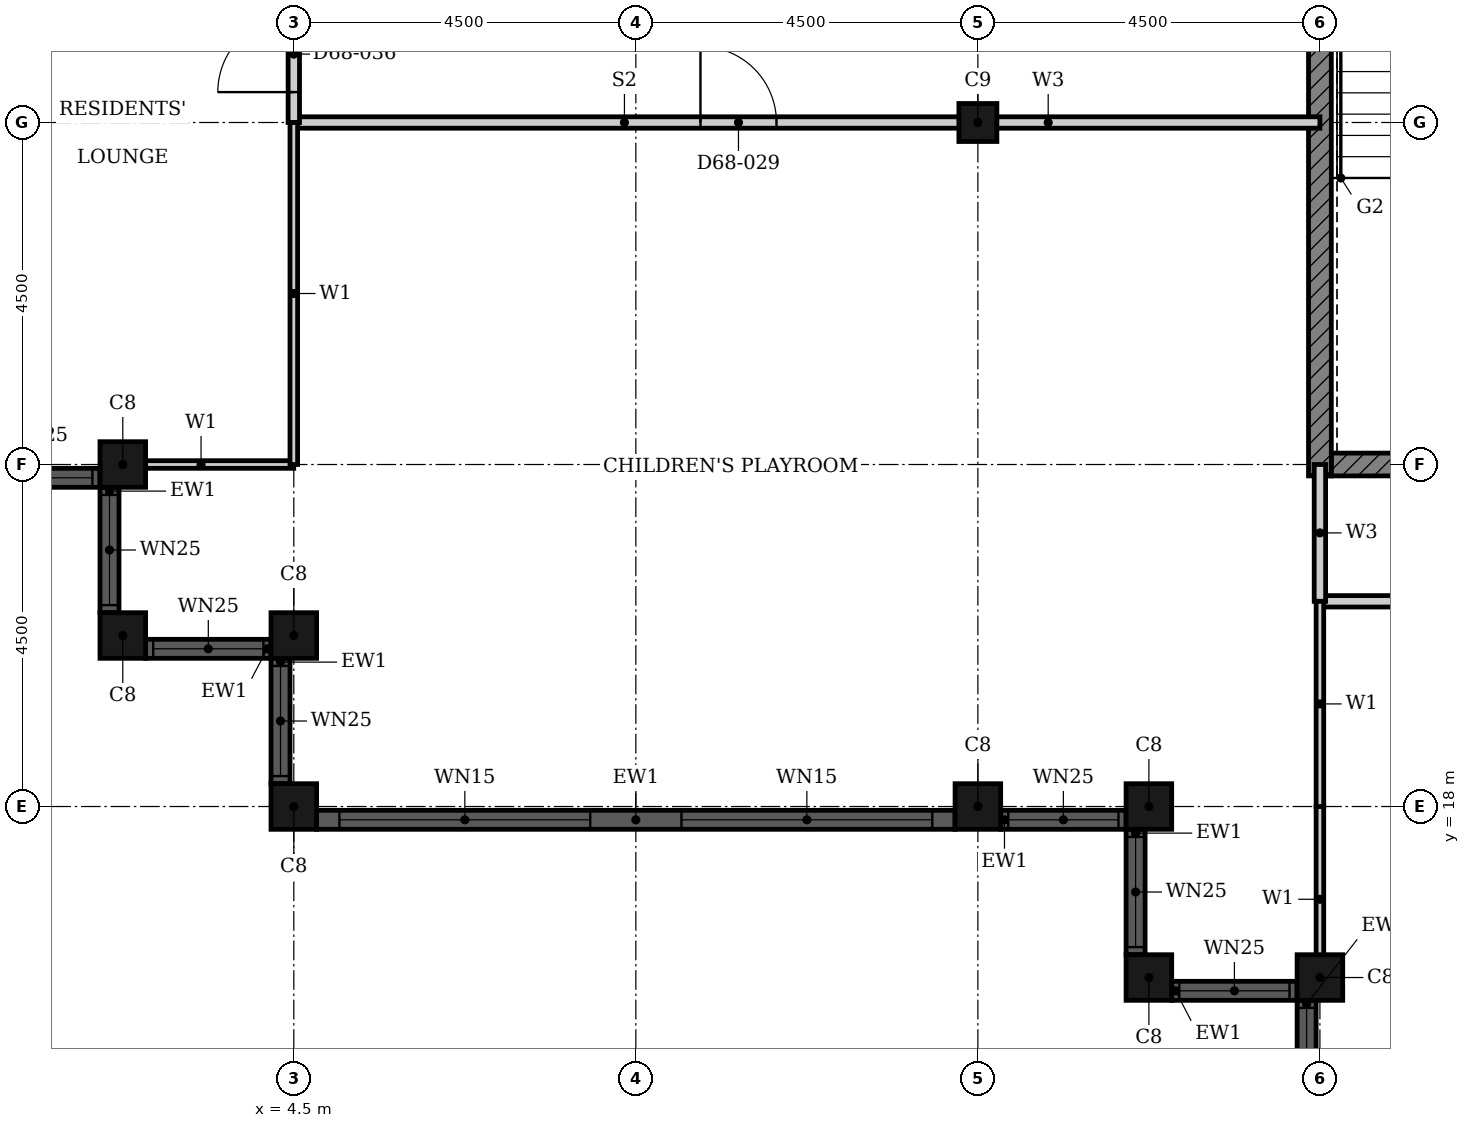
"""IFC4 building model, lengths in metres.
Left out: names, types, materials, properties, quantities, classifications, styles, units other than length and angle.
Written with IfcOpenShell. Run it as: python <this file> out.ifc"""

import sys

from ifc_helpers import new_model, si_unit, direction, frame, frame_2d, origin, origin_2d, place, context, subcontext, project, spatial, rectangle, hollow_rectangle, extrude, element, fill, save


model = new_model("IFC4")
c1 = context("Model", 3, precision=1e-05, world=origin(), true_north=direction((0.0, 1.0)))
c2 = subcontext(c1, "Body", "Model", "MODEL_VIEW")
j1 = project(units=[si_unit("LENGTHUNIT", "METRE"), si_unit("PLANEANGLEUNIT", "RADIAN")], contexts=[c1])
p1 = place(None, origin())
s1 = spatial("IfcSite", under=j1, at=p1, CompositionType="ELEMENT")
p2 = place(p1, origin())
s2 = spatial("IfcBuilding", under=s1, at=p2, CompositionType="ELEMENT")
p3 = place(p2, frame((0.0, 0.0, 267.5)))
s3 = spatial("IfcBuildingStorey", under=s2, at=p3, CompositionType="ELEMENT", Elevation=267.5)
for number, where, z_axis, x_axis in (
    (1, (15.75, 18.0, 0.0), (0.0, 0.0, 1.0), (1.0, 0.0, 0.0)),
    (2, (15.75, 15.75, 0.0), (0.0, 0.0, 1.0), (1.0, 0.0, 0.0)),
    (3, (18.0, 15.75, 0.0), (0.0, 0.0, 1.0), (1.0, 0.0, 0.0)),
    (4, (2.25, 22.5, 0.0), (0.0, 0.0, 1.0), (1.0, 0.0, 0.0)),
    (5, (2.25, 20.25, 0.0), (0.0, 0.0, 1.0), (1.0, 0.0, 0.0)),
    (6, (4.5, 20.25, 0.0), (0.0, 0.0, 1.0), (1.0, 0.0, 0.0)),
    (7, (4.5, 18.0, 0.0), (0.0, 0.0, 1.0), (1.0, 0.0, 0.0)),
    (8, (13.5, 18.0, 0.0), (0.0, 0.0, 1.0), (1.0, 0.0, 0.0)),
):
    element("IfcColumn", number, at=place(p3, frame(where, z_axis=z_axis, x_axis=x_axis)), inside=s3, PredefinedType="COLUMN", context=c2, shape_type="SweptSolid", body=[
        extrude(hollow_rectangle(XDim=0.6, YDim=0.6, WallThickness=0.02, at=origin_2d()), origin(), (0.0, 0.0, 1.0), 3.7),
    ])
p4 = place(p3, frame((13.5, 27.0, 0.0), z_axis=(0.0, 0.0, 1.0), x_axis=(1.0, 0.0, 0.0)))
e9 = element("IfcColumn", 9, at=p4, inside=s3, PredefinedType="COLUMN", context=c2, shape_type="SweptSolid", body=[
    extrude(hollow_rectangle(XDim=0.5, YDim=0.5, WallThickness=0.016, InnerFilletRadius=0.032, OuterFilletRadius=0.048, at=origin_2d()), origin(), (0.0, 0.0, 1.0), 3.7),
])
p5 = place(p3, frame((15.575, 17.7, 0.0), z_axis=(0.0, 0.0, 1.0), x_axis=(0.0, -1.0, 0.0)))
e10 = element("IfcWall", 10, at=p5, inside=s3, PredefinedType="SOLIDWALL", context=c2, shape_type="SweptSolid", body=[
    extrude(rectangle(XDim=1.65, YDim=0.25, at=frame_2d((0.825, 0.0))), origin(), (0.0, 0.0, 1.0), 3.7),
])
p6 = place(p5, frame((0.1, 0.0, 0.9)))
e11 = element("IfcOpeningElement", 11, at=p6, cuts=e10, PredefinedType="OPENING", context=c2, shape_type="SweptSolid", body=[
    extrude(rectangle(XDim=1.45, YDim=1.85, at=frame_2d((0.725, 0.925))), frame((0.0, 0.135, 0.0), z_axis=(0.0, -1.0, 0.0), x_axis=(1.0, 0.0, 0.0)), (0.0, 0.0, 1.0), 0.27),
])
p7 = place(p3, frame((16.05, 15.575, 0.0), z_axis=(0.0, 0.0, 1.0), x_axis=(1.0, 0.0, 0.0)))
e12 = element("IfcWall", 12, at=p7, inside=s3, PredefinedType="SOLIDWALL", context=c2, shape_type="SweptSolid", body=[
    extrude(rectangle(XDim=1.65, YDim=0.25, at=frame_2d((0.825, 0.0))), origin(), (0.0, 0.0, 1.0), 3.7),
])
p8 = place(p7, frame((0.1, 0.0, 0.9)))
e13 = element("IfcOpeningElement", 13, at=p8, cuts=e12, PredefinedType="OPENING", context=c2, shape_type="SweptSolid", body=[
    extrude(rectangle(XDim=1.45, YDim=1.85, at=frame_2d((0.725, 0.925))), frame((0.0, 0.135, 0.0), z_axis=(0.0, -1.0, 0.0), x_axis=(1.0, 0.0, 0.0)), (0.0, 0.0, 1.0), 0.27),
])
p9 = place(p3, frame((17.825, 15.45, 0.0), z_axis=(0.0, 0.0, 1.0), x_axis=(0.0, -1.0, 0.0)))
e14 = element("IfcWall", 14, at=p9, inside=s3, PredefinedType="SOLIDWALL", context=c2, shape_type="SweptSolid", body=[
    extrude(rectangle(XDim=1.65, YDim=0.25, at=frame_2d((0.825, 0.0))), origin(), (0.0, 0.0, 1.0), 3.7),
])
p10 = place(p9, frame((0.1, 0.0, 0.9)))
e15 = element("IfcOpeningElement", 15, at=p10, cuts=e14, PredefinedType="OPENING", context=c2, shape_type="SweptSolid", body=[
    extrude(rectangle(XDim=1.45, YDim=1.85, at=frame_2d((0.725, 0.925))), frame((0.0, 0.135, 0.0), z_axis=(0.0, -1.0, 0.0), x_axis=(1.0, 0.0, 0.0)), (0.0, 0.0, 1.0), 0.27),
])
p11 = place(p3, frame((0.3, 22.325, 0.0), z_axis=(0.0, 0.0, 1.0), x_axis=(1.0, 0.0, 0.0)))
e16 = element("IfcWall", 16, at=p11, inside=s3, PredefinedType="SOLIDWALL", context=c2, shape_type="SweptSolid", body=[
    extrude(rectangle(XDim=1.65, YDim=0.25, at=frame_2d((0.825, 0.0))), origin(), (0.0, 0.0, 1.0), 3.7),
])
p12 = place(p11, frame((0.1, 0.0, 0.9)))
e17 = element("IfcOpeningElement", 17, at=p12, cuts=e16, PredefinedType="OPENING", context=c2, shape_type="SweptSolid", body=[
    extrude(rectangle(XDim=1.45, YDim=1.85, at=frame_2d((0.725, 0.925))), frame((0.0, 0.135, 0.0), z_axis=(0.0, -1.0, 0.0), x_axis=(1.0, 0.0, 0.0)), (0.0, 0.0, 1.0), 0.27),
])
p13 = place(p3, frame((2.075, 22.2, 0.0), z_axis=(0.0, 0.0, 1.0), x_axis=(0.0, -1.0, 0.0)))
e18 = element("IfcWall", 18, at=p13, inside=s3, PredefinedType="SOLIDWALL", context=c2, shape_type="SweptSolid", body=[
    extrude(rectangle(XDim=1.65, YDim=0.25, at=frame_2d((0.825, 0.0))), origin(), (0.0, 0.0, 1.0), 3.7),
])
p14 = place(p13, frame((0.1, 0.0, 0.9)))
e19 = element("IfcOpeningElement", 19, at=p14, cuts=e18, PredefinedType="OPENING", context=c2, shape_type="SweptSolid", body=[
    extrude(rectangle(XDim=1.45, YDim=1.85, at=frame_2d((0.725, 0.925))), frame((0.0, 0.135, 0.0), z_axis=(0.0, -1.0, 0.0), x_axis=(1.0, 0.0, 0.0)), (0.0, 0.0, 1.0), 0.27),
])
p15 = place(p3, frame((2.55, 20.075, 0.0), z_axis=(0.0, 0.0, 1.0), x_axis=(1.0, 0.0, 0.0)))
e20 = element("IfcWall", 20, at=p15, inside=s3, PredefinedType="SOLIDWALL", context=c2, shape_type="SweptSolid", body=[
    extrude(rectangle(XDim=1.65, YDim=0.25, at=frame_2d((0.825, 0.0))), origin(), (0.0, 0.0, 1.0), 3.7),
])
p16 = place(p15, frame((0.1, 0.0, 0.9)))
e21 = element("IfcOpeningElement", 21, at=p16, cuts=e20, PredefinedType="OPENING", context=c2, shape_type="SweptSolid", body=[
    extrude(rectangle(XDim=1.45, YDim=1.85, at=frame_2d((0.725, 0.925))), frame((0.0, 0.135, 0.0), z_axis=(0.0, -1.0, 0.0), x_axis=(1.0, 0.0, 0.0)), (0.0, 0.0, 1.0), 0.27),
])
p17 = place(p3, frame((4.325, 19.95, 0.0), z_axis=(0.0, 0.0, 1.0), x_axis=(0.0, -1.0, 0.0)))
e22 = element("IfcWall", 22, at=p17, inside=s3, PredefinedType="SOLIDWALL", context=c2, shape_type="SweptSolid", body=[
    extrude(rectangle(XDim=1.65, YDim=0.25, at=frame_2d((0.825, 0.0))), origin(), (0.0, 0.0, 1.0), 3.7),
])
p18 = place(p17, frame((0.1, 0.0, 0.9)))
e23 = element("IfcOpeningElement", 23, at=p18, cuts=e22, PredefinedType="OPENING", context=c2, shape_type="SweptSolid", body=[
    extrude(rectangle(XDim=1.45, YDim=1.85, at=frame_2d((0.725, 0.925))), frame((0.0, 0.135, 0.0), z_axis=(0.0, -1.0, 0.0), x_axis=(1.0, 0.0, 0.0)), (0.0, 0.0, 1.0), 0.27),
])
p19 = place(p3, frame((4.8, 17.825, 0.0), z_axis=(0.0, 0.0, 1.0), x_axis=(1.0, 0.0, 0.0)))
e24 = element("IfcWall", 24, at=p19, inside=s3, PredefinedType="SOLIDWALL", context=c2, shape_type="SweptSolid", body=[
    extrude(rectangle(XDim=8.4, YDim=0.25, at=frame_2d((4.2, 0.0))), origin(), (0.0, 0.0, 1.0), 3.7),
])
p20 = place(p19, frame((0.3, 0.0, 0.45)))
e25 = element("IfcOpeningElement", 25, at=p20, cuts=e24, PredefinedType="OPENING", context=c2, shape_type="SweptSolid", body=[
    extrude(rectangle(XDim=3.3, YDim=2.3, at=frame_2d((1.65, 1.15))), frame((0.0, 0.135, 0.0), z_axis=(0.0, -1.0, 0.0), x_axis=(1.0, 0.0, 0.0)), (0.0, 0.0, 1.0), 0.27),
])
p21 = place(p19, frame((4.8, 0.0, 0.45)))
e26 = element("IfcOpeningElement", 26, at=p21, cuts=e24, PredefinedType="OPENING", context=c2, shape_type="SweptSolid", body=[
    extrude(rectangle(XDim=3.3, YDim=2.3, at=frame_2d((1.65, 1.15))), frame((0.0, 0.135, 0.0), z_axis=(0.0, -1.0, 0.0), x_axis=(1.0, 0.0, 0.0)), (0.0, 0.0, 1.0), 0.27),
])
p22 = place(p3, frame((13.8, 17.825, 0.0), z_axis=(0.0, 0.0, 1.0), x_axis=(1.0, 0.0, 0.0)))
e27 = element("IfcWall", 27, at=p22, inside=s3, PredefinedType="SOLIDWALL", context=c2, shape_type="SweptSolid", body=[
    extrude(rectangle(XDim=1.65, YDim=0.25, at=frame_2d((0.825, 0.0))), origin(), (0.0, 0.0, 1.0), 3.7),
])
p23 = place(p22, frame((0.1, 0.0, 0.9)))
e28 = element("IfcOpeningElement", 28, at=p23, cuts=e27, PredefinedType="OPENING", context=c2, shape_type="SweptSolid", body=[
    extrude(rectangle(XDim=1.45, YDim=1.85, at=frame_2d((0.725, 0.925))), frame((0.0, 0.135, 0.0), z_axis=(0.0, -1.0, 0.0), x_axis=(1.0, 0.0, 0.0)), (0.0, 0.0, 1.0), 0.27),
])
p24 = place(p3, frame((18.15, 22.5, 0.0), z_axis=(0.0, 0.0, 1.0), x_axis=(1.0, 0.0, 0.0)))
e29 = element("IfcWall", 29, at=p24, inside=s3, PredefinedType="SHEAR", context=c2, shape_type="SweptSolid", body=[
    extrude(rectangle(XDim=4.225, YDim=0.3, at=frame_2d((2.113, 0.0))), origin(), (0.0, 0.0, 1.0), 3.4),
])
p25 = place(p3, frame((18.0, 22.35, 0.0), z_axis=(0.0, 0.0, 1.0), x_axis=(0.0, 1.0, 0.0)))
e30 = element("IfcWall", 30, at=p25, inside=s3, PredefinedType="SHEAR", context=c2, shape_type="SweptSolid", body=[
    extrude(rectangle(XDim=9.3, YDim=0.3, at=frame_2d((4.65, 0.0))), origin(), (0.0, 0.0, 1.0), 3.4),
])
p26 = place(p3, frame((18.0, 20.7, 0.0), z_axis=(0.0, 0.0, 1.0), x_axis=(1.0, 0.0, 0.0)))
e31 = element("IfcWall", 31, at=p26, inside=s3, PredefinedType="PARTITIONING", context=c2, shape_type="SweptSolid", body=[
    extrude(rectangle(XDim=24.6, YDim=0.15, at=frame_2d((12.3, 0.0))), origin(), (0.0, 0.0, 1.0), 3.4),
])
p27 = place(p26, frame((4.0, 0.0, 0.0)))
e32 = element("IfcOpeningElement", 32, at=p27, cuts=e31, PredefinedType="OPENING", context=c2, shape_type="SweptSolid", body=[
    extrude(rectangle(XDim=1.0, YDim=2.1, at=frame_2d((0.5, 1.05))), frame((0.0, 0.085, 0.0), z_axis=(0.0, -1.0, 0.0), x_axis=(1.0, 0.0, 0.0)), (0.0, 0.0, 1.0), 0.17),
])
p28 = place(p26, frame((13.0, 0.0, 0.0)))
e33 = element("IfcOpeningElement", 33, at=p28, cuts=e31, PredefinedType="OPENING", context=c2, shape_type="SweptSolid", body=[
    extrude(rectangle(XDim=1.0, YDim=2.1, at=frame_2d((0.5, 1.05))), frame((0.0, 0.085, 0.0), z_axis=(0.0, -1.0, 0.0), x_axis=(1.0, 0.0, 0.0)), (0.0, 0.0, 1.0), 0.17),
])
p29 = place(p26, frame((22.3, 0.0, 0.0)))
e34 = element("IfcOpeningElement", 34, at=p29, cuts=e31, PredefinedType="OPENING", context=c2, shape_type="SweptSolid", body=[
    extrude(rectangle(XDim=1.0, YDim=2.2, at=frame_2d((0.5, 1.1))), frame((0.0, 0.085, 0.0), z_axis=(0.0, -1.0, 0.0), x_axis=(1.0, 0.0, 0.0)), (0.0, 0.0, 1.0), 0.17),
])
p30 = place(p3, frame((4.5, 27.0, 0.0), z_axis=(0.0, 0.0, 1.0), x_axis=(1.0, 0.0, 0.0)))
e35 = element("IfcWall", 35, at=p30, inside=s3, PredefinedType="PARTITIONING", context=c2, shape_type="SweptSolid", body=[
    extrude(rectangle(XDim=13.5, YDim=0.15, at=frame_2d((6.75, 0.0))), origin(), (0.0, 0.0, 1.0), 2.68),
])
p31 = place(p30, frame((5.35, 0.0, 0.0)))
e36 = element("IfcOpeningElement", 36, at=p31, cuts=e35, PredefinedType="OPENING", context=c2, shape_type="SweptSolid", body=[
    extrude(rectangle(XDim=1.0, YDim=2.1, at=frame_2d((0.5, 1.05))), frame((0.0, 0.085, 0.0), z_axis=(0.0, -1.0, 0.0), x_axis=(1.0, 0.0, 0.0)), (0.0, 0.0, 1.0), 0.17),
])
p32 = place(p3, frame((18.0, 20.7, 0.0), z_axis=(0.0, 0.0, 1.0), x_axis=(0.0, 1.0, 0.0)))
e37 = element("IfcWall", 37, at=p32, inside=s3, PredefinedType="PARTITIONING", context=c2, shape_type="SweptSolid", body=[
    extrude(rectangle(XDim=1.8, YDim=0.15, at=frame_2d((0.9, 0.0))), origin(), (0.0, 0.0, 1.0), 3.4),
])
p33 = place(p3, frame((4.5, 27.0, 0.0), z_axis=(0.0, 0.0, 1.0), x_axis=(0.0, 1.0, 0.0)))
e38 = element("IfcWall", 38, at=p33, inside=s3, PredefinedType="PARTITIONING", context=c2, shape_type="SweptSolid", body=[
    extrude(rectangle(XDim=1.8, YDim=0.15, at=frame_2d((0.9, 0.0))), origin(), (0.0, 0.0, 1.0), 3.4),
])
p34 = place(p33, frame((0.4, 0.0, 0.0)))
e39 = element("IfcOpeningElement", 39, at=p34, cuts=e38, PredefinedType="OPENING", context=c2, shape_type="SweptSolid", body=[
    extrude(rectangle(XDim=1.0, YDim=2.1, at=frame_2d((0.5, 1.05))), frame((0.0, 0.085, 0.0), z_axis=(0.0, -1.0, 0.0), x_axis=(1.0, 0.0, 0.0)), (0.0, 0.0, 1.0), 0.17),
])
p35 = place(p3, frame((2.06, 22.5, 0.0), z_axis=(0.0, 0.0, 1.0), x_axis=(1.0, 0.0, 0.0)))
e40 = element("IfcWall", 40, at=p35, inside=s3, PredefinedType="PARTITIONING", context=c2, shape_type="SweptSolid", body=[
    extrude(rectangle(XDim=2.439, YDim=0.1, at=frame_2d((1.219, 0.0))), origin(), (0.0, 0.0, 1.0), 2.68),
])
p36 = place(p3, frame((18.0, 15.56, 0.0), z_axis=(0.0, 0.0, 1.0), x_axis=(0.0, 1.0, 0.0)))
e41 = element("IfcWall", 41, at=p36, inside=s3, PredefinedType="PARTITIONING", context=c2, shape_type="SweptSolid", body=[
    extrude(rectangle(XDim=2.439, YDim=0.1, at=frame_2d((1.219, 0.0))), origin(), (0.0, 0.0, 1.0), 3.4),
])
p37 = place(p3, frame((18.0, 18.0, 0.0), z_axis=(0.0, 0.0, 1.0), x_axis=(0.0, 1.0, 0.0)))
e42 = element("IfcWall", 42, at=p37, inside=s3, PredefinedType="PARTITIONING", context=c2, shape_type="SweptSolid", body=[
    extrude(rectangle(XDim=2.7, YDim=0.1, at=frame_2d((1.35, 0.0))), origin(), (0.0, 0.0, 1.0), 3.4),
])
p38 = place(p3, frame((4.5, 22.5, 0.0), z_axis=(0.0, 0.0, 1.0), x_axis=(0.0, 1.0, 0.0)))
e43 = element("IfcWall", 43, at=p38, inside=s3, PredefinedType="PARTITIONING", context=c2, shape_type="SweptSolid", body=[
    extrude(rectangle(XDim=4.5, YDim=0.1, at=frame_2d((2.25, 0.0))), origin(), (0.0, 0.0, 1.0), 3.4),
])
p39 = place(p6, origin())
e44 = element("IfcWindow", 44, at=p39, inside=s3, PartitioningType="SINGLE_PANEL", PredefinedType="WINDOW", context=c2, shape_type="SweptSolid", body=[
    extrude(rectangle(XDim=1.45, YDim=1.85, at=frame_2d((0.725, 0.925))), frame((0.0, 0.03, 0.0), z_axis=(0.0, -1.0, 0.0), x_axis=(1.0, 0.0, 0.0)), (0.0, 0.0, 1.0), 0.06),
])
fill(e11, e44)
p40 = place(p8, origin())
e45 = element("IfcWindow", 45, at=p40, inside=s3, PartitioningType="SINGLE_PANEL", PredefinedType="WINDOW", context=c2, shape_type="SweptSolid", body=[
    extrude(rectangle(XDim=1.45, YDim=1.85, at=frame_2d((0.725, 0.925))), frame((0.0, 0.03, 0.0), z_axis=(0.0, -1.0, 0.0), x_axis=(1.0, 0.0, 0.0)), (0.0, 0.0, 1.0), 0.06),
])
fill(e13, e45)
p41 = place(p10, origin())
e46 = element("IfcWindow", 46, at=p41, inside=s3, PartitioningType="SINGLE_PANEL", PredefinedType="WINDOW", context=c2, shape_type="SweptSolid", body=[
    extrude(rectangle(XDim=1.45, YDim=1.85, at=frame_2d((0.725, 0.925))), frame((0.0, 0.03, 0.0), z_axis=(0.0, -1.0, 0.0), x_axis=(1.0, 0.0, 0.0)), (0.0, 0.0, 1.0), 0.06),
])
fill(e15, e46)
p42 = place(p12, origin())
e47 = element("IfcWindow", 47, at=p42, inside=s3, PartitioningType="SINGLE_PANEL", PredefinedType="WINDOW", context=c2, shape_type="SweptSolid", body=[
    extrude(rectangle(XDim=1.45, YDim=1.85, at=frame_2d((0.725, 0.925))), frame((0.0, 0.03, 0.0), z_axis=(0.0, -1.0, 0.0), x_axis=(1.0, 0.0, 0.0)), (0.0, 0.0, 1.0), 0.06),
])
fill(e17, e47)
p43 = place(p14, origin())
e48 = element("IfcWindow", 48, at=p43, inside=s3, PartitioningType="SINGLE_PANEL", PredefinedType="WINDOW", context=c2, shape_type="SweptSolid", body=[
    extrude(rectangle(XDim=1.45, YDim=1.85, at=frame_2d((0.725, 0.925))), frame((0.0, 0.03, 0.0), z_axis=(0.0, -1.0, 0.0), x_axis=(1.0, 0.0, 0.0)), (0.0, 0.0, 1.0), 0.06),
])
fill(e19, e48)
p44 = place(p16, origin())
e49 = element("IfcWindow", 49, at=p44, inside=s3, PartitioningType="SINGLE_PANEL", PredefinedType="WINDOW", context=c2, shape_type="SweptSolid", body=[
    extrude(rectangle(XDim=1.45, YDim=1.85, at=frame_2d((0.725, 0.925))), frame((0.0, 0.03, 0.0), z_axis=(0.0, -1.0, 0.0), x_axis=(1.0, 0.0, 0.0)), (0.0, 0.0, 1.0), 0.06),
])
fill(e21, e49)
p45 = place(p18, origin())
e50 = element("IfcWindow", 50, at=p45, inside=s3, PartitioningType="SINGLE_PANEL", PredefinedType="WINDOW", context=c2, shape_type="SweptSolid", body=[
    extrude(rectangle(XDim=1.45, YDim=1.85, at=frame_2d((0.725, 0.925))), frame((0.0, 0.03, 0.0), z_axis=(0.0, -1.0, 0.0), x_axis=(1.0, 0.0, 0.0)), (0.0, 0.0, 1.0), 0.06),
])
fill(e23, e50)
p46 = place(p20, origin())
e51 = element("IfcWindow", 51, at=p46, inside=s3, PartitioningType="SINGLE_PANEL", PredefinedType="WINDOW", context=c2, shape_type="SweptSolid", body=[
    extrude(rectangle(XDim=3.3, YDim=2.3, at=frame_2d((1.65, 1.15))), frame((0.0, 0.03, 0.0), z_axis=(0.0, -1.0, 0.0), x_axis=(1.0, 0.0, 0.0)), (0.0, 0.0, 1.0), 0.06),
])
fill(e25, e51)
p47 = place(p21, origin())
e52 = element("IfcWindow", 52, at=p47, inside=s3, PartitioningType="SINGLE_PANEL", PredefinedType="WINDOW", context=c2, shape_type="SweptSolid", body=[
    extrude(rectangle(XDim=3.3, YDim=2.3, at=frame_2d((1.65, 1.15))), frame((0.0, 0.03, 0.0), z_axis=(0.0, -1.0, 0.0), x_axis=(1.0, 0.0, 0.0)), (0.0, 0.0, 1.0), 0.06),
])
fill(e26, e52)
p48 = place(p23, origin())
e53 = element("IfcWindow", 53, at=p48, inside=s3, PartitioningType="SINGLE_PANEL", PredefinedType="WINDOW", context=c2, shape_type="SweptSolid", body=[
    extrude(rectangle(XDim=1.45, YDim=1.85, at=frame_2d((0.725, 0.925))), frame((0.0, 0.03, 0.0), z_axis=(0.0, -1.0, 0.0), x_axis=(1.0, 0.0, 0.0)), (0.0, 0.0, 1.0), 0.06),
])
fill(e28, e53)
p49 = place(p31, origin())
e54 = element("IfcDoor", 54, at=p49, inside=s3, OperationType="SINGLE_SWING_LEFT", PredefinedType="DOOR", context=c2, shape_type="SweptSolid", body=[
    extrude(rectangle(XDim=1.0, YDim=2.1, at=frame_2d((0.5, 1.05))), frame((0.0, 0.025, 0.0), z_axis=(0.0, -1.0, 0.0), x_axis=(1.0, 0.0, 0.0)), (0.0, 0.0, 1.0), 0.05),
])
fill(e36, e54)
p50 = place(p34, origin())
e55 = element("IfcDoor", 55, at=p50, inside=s3, OperationType="SINGLE_SWING_RIGHT", PredefinedType="DOOR", context=c2, shape_type="SweptSolid", body=[
    extrude(rectangle(XDim=1.0, YDim=2.1, at=frame_2d((0.5, 1.05))), frame((0.0, 0.025, 0.0), z_axis=(0.0, -1.0, 0.0), x_axis=(1.0, 0.0, 0.0)), (0.0, 0.0, 1.0), 0.05),
])
fill(e39, e55)
save(model, sys.argv[1])
